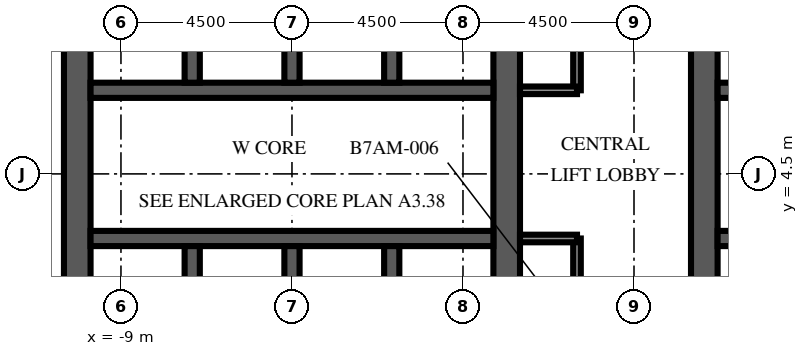
"""IFC4 building model, lengths in metres.
Left out: names, types, materials, properties, quantities, classifications, styles, units other than length and angle.
Written with IfcOpenShell. Run it as: python <this file> out.ifc"""

import sys

from ifc_helpers import new_model, si_unit, direction, frame, frame_2d, origin, place, context, subcontext, project, spatial, rectangle, extrude, element, fill, save


model = new_model("IFC4")
c1 = context("Model", 3, precision=1e-05, world=origin(), true_north=direction((0.0, 1.0)))
c2 = subcontext(c1, "Body", "Model", "MODEL_VIEW")
j1 = project(units=[si_unit("LENGTHUNIT", "METRE"), si_unit("PLANEANGLEUNIT", "RADIAN")], contexts=[c1])
p1 = place(None, origin())
s1 = spatial("IfcSite", under=j1, at=p1, CompositionType="ELEMENT")
p2 = place(p1, origin())
s2 = spatial("IfcBuilding", under=s1, at=p2, CompositionType="ELEMENT")
p3 = place(p2, frame((0.0, 0.0, 260.3)))
s3 = spatial("IfcBuildingStorey", under=s2, at=p3, CompositionType="ELEMENT", Elevation=260.3)
p4 = place(p3, frame((-10.15, -9.0, 0.0), z_axis=(0.0, 0.0, 1.0), x_axis=(0.0, 1.0, 0.0)))
e1 = element("IfcWall", 1, at=p4, inside=s3, PredefinedType="SHEAR", context=c2, shape_type="SweptSolid", body=[
    extrude(rectangle(XDim=27.5, YDim=0.7, at=frame_2d((13.75, 0.0))), origin(), (0.0, 0.0, 1.0), 6.0),
])
p5 = place(p4, frame((12.55, 0.0, 0.0)))
e2 = element("IfcOpeningElement", 2, at=p5, cuts=e1, PredefinedType="OPENING", context=c2, shape_type="SweptSolid", body=[
    extrude(rectangle(XDim=2.4, YDim=2.4, at=frame_2d((1.2, 1.2))), frame((0.0, 0.36, 0.0), z_axis=(0.0, -1.0, 0.0), x_axis=(1.0, 0.0, 0.0)), (0.0, 0.0, 1.0), 0.72),
])
p6 = place(p4, frame((6.825, 0.0, 0.0)))
e3 = element("IfcOpeningElement", 3, at=p6, cuts=e1, PredefinedType="OPENING", context=c2, shape_type="SweptSolid", body=[
    extrude(rectangle(XDim=1.2, YDim=2.1, at=frame_2d((0.6, 1.05))), frame((0.0, 0.36, 0.0), z_axis=(0.0, -1.0, 0.0), x_axis=(1.0, 0.0, 0.0)), (0.0, 0.0, 1.0), 0.72),
])
p7 = place(p4, frame((19.475, 0.0, 0.0)))
e4 = element("IfcOpeningElement", 4, at=p7, cuts=e1, PredefinedType="OPENING", context=c2, shape_type="SweptSolid", body=[
    extrude(rectangle(XDim=1.2, YDim=2.1, at=frame_2d((0.6, 1.05))), frame((0.0, 0.36, 0.0), z_axis=(0.0, -1.0, 0.0), x_axis=(1.0, 0.0, 0.0)), (0.0, 0.0, 1.0), 0.72),
])
p8 = place(p3, frame((1.15, -9.0, 0.0), z_axis=(0.0, 0.0, 1.0), x_axis=(0.0, 1.0, 0.0)))
e5 = element("IfcWall", 5, at=p8, inside=s3, PredefinedType="SHEAR", context=c2, shape_type="SweptSolid", body=[
    extrude(rectangle(XDim=27.5, YDim=0.7, at=frame_2d((13.75, 0.0))), origin(), (0.0, 0.0, 1.0), 6.0),
])
p9 = place(p8, frame((12.55, 0.0, 0.0)))
e6 = element("IfcOpeningElement", 6, at=p9, cuts=e5, PredefinedType="OPENING", context=c2, shape_type="SweptSolid", body=[
    extrude(rectangle(XDim=2.4, YDim=2.4, at=frame_2d((1.2, 1.2))), frame((0.0, 0.36, 0.0), z_axis=(0.0, -1.0, 0.0), x_axis=(1.0, 0.0, 0.0)), (0.0, 0.0, 1.0), 0.72),
])
p10 = place(p8, frame((3.788, 0.0, 0.0)))
e7 = element("IfcOpeningElement", 7, at=p10, cuts=e5, PredefinedType="OPENING", context=c2, shape_type="SweptSolid", body=[
    extrude(rectangle(XDim=0.968, YDim=2.1, at=frame_2d((0.484, 1.05))), frame((0.0, 0.36, 0.0), z_axis=(0.0, -1.0, 0.0), x_axis=(1.0, 0.0, 0.0)), (0.0, 0.0, 1.0), 0.72),
])
p11 = place(p8, frame((23.54, 0.0, 0.0)))
e8 = element("IfcOpeningElement", 8, at=p11, cuts=e5, PredefinedType="OPENING", context=c2, shape_type="SweptSolid", body=[
    extrude(rectangle(XDim=1.2, YDim=2.1, at=frame_2d((0.6, 1.05))), frame((0.0, 0.36, 0.0), z_axis=(0.0, -1.0, 0.0), x_axis=(1.0, 0.0, 0.0)), (0.0, 0.0, 1.0), 0.72),
])
p12 = place(p3, frame((-9.8, 2.8, 0.0), z_axis=(0.0, 0.0, 1.0), x_axis=(1.0, 0.0, 0.0)))
e9 = element("IfcWall", 9, at=p12, inside=s3, PredefinedType="SHEAR", context=c2, shape_type="SweptSolid", body=[
    extrude(rectangle(XDim=10.6, YDim=0.4, at=frame_2d((5.3, 0.0))), origin(), (0.0, 0.0, 1.0), 6.0),
])
p13 = place(p12, frame((0.688, 0.0, 0.0)))
e10 = element("IfcOpeningElement", 10, at=p13, cuts=e9, PredefinedType="OPENING", context=c2, shape_type="SweptSolid", body=[
    extrude(rectangle(XDim=1.1, YDim=2.1, at=frame_2d((0.55, 1.05))), frame((0.0, 0.21, 0.0), z_axis=(0.0, -1.0, 0.0), x_axis=(1.0, 0.0, 0.0)), (0.0, 0.0, 1.0), 0.42),
])
p14 = place(p12, frame((3.438, 0.0, 0.0)))
e11 = element("IfcOpeningElement", 11, at=p14, cuts=e9, PredefinedType="OPENING", context=c2, shape_type="SweptSolid", body=[
    extrude(rectangle(XDim=1.1, YDim=2.1, at=frame_2d((0.55, 1.05))), frame((0.0, 0.21, 0.0), z_axis=(0.0, -1.0, 0.0), x_axis=(1.0, 0.0, 0.0)), (0.0, 0.0, 1.0), 0.42),
])
p15 = place(p12, frame((6.113, 0.0, 0.0)))
e12 = element("IfcOpeningElement", 12, at=p15, cuts=e9, PredefinedType="OPENING", context=c2, shape_type="SweptSolid", body=[
    extrude(rectangle(XDim=1.0, YDim=2.1, at=frame_2d((0.5, 1.05))), frame((0.0, 0.21, 0.0), z_axis=(0.0, -1.0, 0.0), x_axis=(1.0, 0.0, 0.0)), (0.0, 0.0, 1.0), 0.42),
])
p16 = place(p12, frame((8.863, 0.0, 0.0)))
e13 = element("IfcOpeningElement", 13, at=p16, cuts=e9, PredefinedType="OPENING", context=c2, shape_type="SweptSolid", body=[
    extrude(rectangle(XDim=1.0, YDim=2.1, at=frame_2d((0.5, 1.05))), frame((0.0, 0.21, 0.0), z_axis=(0.0, -1.0, 0.0), x_axis=(1.0, 0.0, 0.0)), (0.0, 0.0, 1.0), 0.42),
])
p17 = place(p3, frame((-9.8, 6.7, 0.0), z_axis=(0.0, 0.0, 1.0), x_axis=(1.0, 0.0, 0.0)))
e14 = element("IfcWall", 14, at=p17, inside=s3, PredefinedType="SHEAR", context=c2, shape_type="SweptSolid", body=[
    extrude(rectangle(XDim=10.6, YDim=0.4, at=frame_2d((5.3, 0.0))), origin(), (0.0, 0.0, 1.0), 6.0),
])
p18 = place(p17, frame((3.438, 0.0, 0.0)))
e15 = element("IfcOpeningElement", 15, at=p18, cuts=e14, PredefinedType="OPENING", context=c2, shape_type="SweptSolid", body=[
    extrude(rectangle(XDim=1.1, YDim=2.1, at=frame_2d((0.55, 1.05))), frame((0.0, 0.21, 0.0), z_axis=(0.0, -1.0, 0.0), x_axis=(1.0, 0.0, 0.0)), (0.0, 0.0, 1.0), 0.42),
])
p19 = place(p17, frame((6.062, 0.0, 0.0)))
e16 = element("IfcOpeningElement", 16, at=p19, cuts=e14, PredefinedType="OPENING", context=c2, shape_type="SweptSolid", body=[
    extrude(rectangle(XDim=1.1, YDim=2.1, at=frame_2d((0.55, 1.05))), frame((0.0, 0.21, 0.0), z_axis=(0.0, -1.0, 0.0), x_axis=(1.0, 0.0, 0.0)), (0.0, 0.0, 1.0), 0.42),
])
p20 = place(p17, frame((8.812, 0.0, 0.0)))
e17 = element("IfcOpeningElement", 17, at=p20, cuts=e14, PredefinedType="OPENING", context=c2, shape_type="SweptSolid", body=[
    extrude(rectangle(XDim=1.1, YDim=2.1, at=frame_2d((0.55, 1.05))), frame((0.0, 0.21, 0.0), z_axis=(0.0, -1.0, 0.0), x_axis=(1.0, 0.0, 0.0)), (0.0, 0.0, 1.0), 0.42),
])
p21 = place(p17, frame((0.738, 0.0, 0.0)))
e18 = element("IfcOpeningElement", 18, at=p21, cuts=e14, PredefinedType="OPENING", context=c2, shape_type="SweptSolid", body=[
    extrude(rectangle(XDim=1.0, YDim=2.1, at=frame_2d((0.5, 1.05))), frame((0.0, 0.21, 0.0), z_axis=(0.0, -1.0, 0.0), x_axis=(1.0, 0.0, 0.0)), (0.0, 0.0, 1.0), 0.42),
])
for number, where, z_axis, x_axis in (
    (19, (-7.125, -0.3, 0.0), (0.0, 0.0, 1.0), (0.0, 1.0, 0.0)),
    (20, (-7.125, 6.9, 0.0), (0.0, 0.0, 1.0), (0.0, 1.0, 0.0)),
    (21, (-4.5, -0.3, 0.0), (0.0, 0.0, 1.0), (0.0, 1.0, 0.0)),
    (22, (-4.5, 6.9, 0.0), (0.0, 0.0, 1.0), (0.0, 1.0, 0.0)),
    (23, (-1.875, -0.3, 0.0), (0.0, 0.0, 1.0), (0.0, 1.0, 0.0)),
    (24, (-1.875, 6.9, 0.0), (0.0, 0.0, 1.0), (0.0, 1.0, 0.0)),
):
    element("IfcWall", number, at=place(p3, frame(where, z_axis=z_axis, x_axis=x_axis)), inside=s3, PredefinedType="SHEAR", context=c2, shape_type="SweptSolid", body=[
        extrude(rectangle(XDim=2.9, YDim=0.4, at=frame_2d((1.45, 0.0))), origin(), (0.0, 0.0, 1.0), 6.0),
    ])
p22 = place(p3, frame((6.35, -9.0, 0.0), z_axis=(0.0, 0.0, 1.0), x_axis=(0.0, 1.0, 0.0)))
e25 = element("IfcWall", 25, at=p22, inside=s3, PredefinedType="SHEAR", context=c2, shape_type="SweptSolid", body=[
    extrude(rectangle(XDim=27.5, YDim=0.7, at=frame_2d((13.75, 0.0))), origin(), (0.0, 0.0, 1.0), 6.0),
])
p23 = place(p22, frame((12.55, 0.0, 0.0)))
e26 = element("IfcOpeningElement", 26, at=p23, cuts=e25, PredefinedType="OPENING", context=c2, shape_type="SweptSolid", body=[
    extrude(rectangle(XDim=2.4, YDim=2.4, at=frame_2d((1.2, 1.2))), frame((0.0, 0.36, 0.0), z_axis=(0.0, -1.0, 0.0), x_axis=(1.0, 0.0, 0.0)), (0.0, 0.0, 1.0), 0.72),
])
p24 = place(p22, frame((3.788, 0.0, 0.0)))
e27 = element("IfcOpeningElement", 27, at=p24, cuts=e25, PredefinedType="OPENING", context=c2, shape_type="SweptSolid", body=[
    extrude(rectangle(XDim=0.968, YDim=2.1, at=frame_2d((0.484, 1.05))), frame((0.0, 0.36, 0.0), z_axis=(0.0, -1.0, 0.0), x_axis=(1.0, 0.0, 0.0)), (0.0, 0.0, 1.0), 0.72),
])
p25 = place(p22, frame((23.54, 0.0, 0.0)))
e28 = element("IfcOpeningElement", 28, at=p25, cuts=e25, PredefinedType="OPENING", context=c2, shape_type="SweptSolid", body=[
    extrude(rectangle(XDim=1.2, YDim=2.1, at=frame_2d((0.6, 1.05))), frame((0.0, 0.36, 0.0), z_axis=(0.0, -1.0, 0.0), x_axis=(1.0, 0.0, 0.0)), (0.0, 0.0, 1.0), 0.72),
])
p26 = place(p3, frame((6.7, 2.8, 0.0), z_axis=(0.0, 0.0, 1.0), x_axis=(1.0, 0.0, 0.0)))
e29 = element("IfcWall", 29, at=p26, inside=s3, PredefinedType="SHEAR", context=c2, shape_type="SweptSolid", body=[
    extrude(rectangle(XDim=10.6, YDim=0.4, at=frame_2d((5.3, 0.0))), origin(), (0.0, 0.0, 1.0), 6.0),
])
p27 = place(p26, frame((0.688, 0.0, 0.0)))
e30 = element("IfcOpeningElement", 30, at=p27, cuts=e29, PredefinedType="OPENING", context=c2, shape_type="SweptSolid", body=[
    extrude(rectangle(XDim=1.1, YDim=2.1, at=frame_2d((0.55, 1.05))), frame((0.0, 0.21, 0.0), z_axis=(0.0, -1.0, 0.0), x_axis=(1.0, 0.0, 0.0)), (0.0, 0.0, 1.0), 0.42),
])
p28 = place(p26, frame((3.438, 0.0, 0.0)))
e31 = element("IfcOpeningElement", 31, at=p28, cuts=e29, PredefinedType="OPENING", context=c2, shape_type="SweptSolid", body=[
    extrude(rectangle(XDim=1.1, YDim=2.1, at=frame_2d((0.55, 1.05))), frame((0.0, 0.21, 0.0), z_axis=(0.0, -1.0, 0.0), x_axis=(1.0, 0.0, 0.0)), (0.0, 0.0, 1.0), 0.42),
])
p29 = place(p26, frame((6.113, 0.0, 0.0)))
e32 = element("IfcOpeningElement", 32, at=p29, cuts=e29, PredefinedType="OPENING", context=c2, shape_type="SweptSolid", body=[
    extrude(rectangle(XDim=1.0, YDim=2.1, at=frame_2d((0.5, 1.05))), frame((0.0, 0.21, 0.0), z_axis=(0.0, -1.0, 0.0), x_axis=(1.0, 0.0, 0.0)), (0.0, 0.0, 1.0), 0.42),
])
p30 = place(p26, frame((8.863, 0.0, 0.0)))
e33 = element("IfcOpeningElement", 33, at=p30, cuts=e29, PredefinedType="OPENING", context=c2, shape_type="SweptSolid", body=[
    extrude(rectangle(XDim=1.0, YDim=2.1, at=frame_2d((0.5, 1.05))), frame((0.0, 0.21, 0.0), z_axis=(0.0, -1.0, 0.0), x_axis=(1.0, 0.0, 0.0)), (0.0, 0.0, 1.0), 0.42),
])
p31 = place(p3, frame((6.7, 6.7, 0.0), z_axis=(0.0, 0.0, 1.0), x_axis=(1.0, 0.0, 0.0)))
e34 = element("IfcWall", 34, at=p31, inside=s3, PredefinedType="SHEAR", context=c2, shape_type="SweptSolid", body=[
    extrude(rectangle(XDim=10.6, YDim=0.4, at=frame_2d((5.3, 0.0))), origin(), (0.0, 0.0, 1.0), 6.0),
])
p32 = place(p31, frame((3.438, 0.0, 0.0)))
e35 = element("IfcOpeningElement", 35, at=p32, cuts=e34, PredefinedType="OPENING", context=c2, shape_type="SweptSolid", body=[
    extrude(rectangle(XDim=1.1, YDim=2.1, at=frame_2d((0.55, 1.05))), frame((0.0, 0.21, 0.0), z_axis=(0.0, -1.0, 0.0), x_axis=(1.0, 0.0, 0.0)), (0.0, 0.0, 1.0), 0.42),
])
p33 = place(p31, frame((6.062, 0.0, 0.0)))
e36 = element("IfcOpeningElement", 36, at=p33, cuts=e34, PredefinedType="OPENING", context=c2, shape_type="SweptSolid", body=[
    extrude(rectangle(XDim=1.1, YDim=2.1, at=frame_2d((0.55, 1.05))), frame((0.0, 0.21, 0.0), z_axis=(0.0, -1.0, 0.0), x_axis=(1.0, 0.0, 0.0)), (0.0, 0.0, 1.0), 0.42),
])
p34 = place(p31, frame((8.812, 0.0, 0.0)))
e37 = element("IfcOpeningElement", 37, at=p34, cuts=e34, PredefinedType="OPENING", context=c2, shape_type="SweptSolid", body=[
    extrude(rectangle(XDim=1.1, YDim=2.1, at=frame_2d((0.55, 1.05))), frame((0.0, 0.21, 0.0), z_axis=(0.0, -1.0, 0.0), x_axis=(1.0, 0.0, 0.0)), (0.0, 0.0, 1.0), 0.42),
])
p35 = place(p31, frame((0.738, 0.0, 0.0)))
e38 = element("IfcOpeningElement", 38, at=p35, cuts=e34, PredefinedType="OPENING", context=c2, shape_type="SweptSolid", body=[
    extrude(rectangle(XDim=1.0, YDim=2.1, at=frame_2d((0.5, 1.05))), frame((0.0, 0.21, 0.0), z_axis=(0.0, -1.0, 0.0), x_axis=(1.0, 0.0, 0.0)), (0.0, 0.0, 1.0), 0.42),
])
p36 = place(p3, frame((3.0, -3.5, 0.0), z_axis=(0.0, 0.0, 1.0), x_axis=(0.0, 1.0, 0.0)))
e39 = element("IfcWall", 39, at=p36, inside=s3, PredefinedType="PARTITIONING", context=c2, shape_type="SweptSolid", body=[
    extrude(rectangle(XDim=6.3, YDim=0.2, at=frame_2d((3.15, 0.0))), origin(), (0.0, 0.0, 1.0), 5.55),
])
p37 = place(p36, frame((3.35, 0.0, 0.0)))
e40 = element("IfcOpeningElement", 40, at=p37, cuts=e39, PredefinedType="OPENING", context=c2, shape_type="SweptSolid", body=[
    extrude(rectangle(XDim=1.0, YDim=2.1, at=frame_2d((0.5, 1.05))), frame((0.0, 0.11, 0.0), z_axis=(0.0, -1.0, 0.0), x_axis=(1.0, 0.0, 0.0)), (0.0, 0.0, 1.0), 0.22),
])
p38 = place(p3, frame((3.0, 6.7, 0.0), z_axis=(0.0, 0.0, 1.0), x_axis=(0.0, 1.0, 0.0)))
e41 = element("IfcWall", 41, at=p38, inside=s3, PredefinedType="PARTITIONING", context=c2, shape_type="SweptSolid", body=[
    extrude(rectangle(XDim=11.8, YDim=0.2, at=frame_2d((5.9, 0.0))), origin(), (0.0, 0.0, 1.0), 5.55),
])
p39 = place(p38, frame((5.6, 0.0, 0.0)))
e42 = element("IfcOpeningElement", 42, at=p39, cuts=e41, PredefinedType="OPENING", context=c2, shape_type="SweptSolid", body=[
    extrude(rectangle(XDim=1.0, YDim=2.1, at=frame_2d((0.5, 1.05))), frame((0.0, 0.11, 0.0), z_axis=(0.0, -1.0, 0.0), x_axis=(1.0, 0.0, 0.0)), (0.0, 0.0, 1.0), 0.22),
])
for number, where, z_axis, x_axis in (
    (43, (1.5, 2.8, 0.0), (0.0, 0.0, 1.0), (1.0, 0.0, 0.0)),
    (44, (1.5, 6.7, 0.0), (0.0, 0.0, 1.0), (1.0, 0.0, 0.0)),
):
    element("IfcWall", number, at=place(p3, frame(where, z_axis=z_axis, x_axis=x_axis)), inside=s3, PredefinedType="PARTITIONING", context=c2, shape_type="SweptSolid", body=[
        extrude(rectangle(XDim=1.5, YDim=0.2, at=frame_2d((0.75, 0.0))), origin(), (0.0, 0.0, 1.0), 5.55),
    ])
p40 = place(p13, origin())
e45 = element("IfcDoor", 45, at=p40, inside=s3, OperationType="DOUBLE_DOOR_SLIDING", PredefinedType="DOOR", context=c2, shape_type="SweptSolid", body=[
    extrude(rectangle(XDim=1.1, YDim=2.1, at=frame_2d((0.55, 1.05))), frame((0.0, 0.025, 0.0), z_axis=(0.0, -1.0, 0.0), x_axis=(1.0, 0.0, 0.0)), (0.0, 0.0, 1.0), 0.05),
])
fill(e10, e45)
p41 = place(p14, origin())
e46 = element("IfcDoor", 46, at=p41, inside=s3, OperationType="DOUBLE_DOOR_SLIDING", PredefinedType="DOOR", context=c2, shape_type="SweptSolid", body=[
    extrude(rectangle(XDim=1.1, YDim=2.1, at=frame_2d((0.55, 1.05))), frame((0.0, 0.025, 0.0), z_axis=(0.0, -1.0, 0.0), x_axis=(1.0, 0.0, 0.0)), (0.0, 0.0, 1.0), 0.05),
])
fill(e11, e46)
p42 = place(p18, origin())
e47 = element("IfcDoor", 47, at=p42, inside=s3, OperationType="DOUBLE_DOOR_SLIDING", PredefinedType="DOOR", context=c2, shape_type="SweptSolid", body=[
    extrude(rectangle(XDim=1.1, YDim=2.1, at=frame_2d((0.55, 1.05))), frame((0.0, 0.025, 0.0), z_axis=(0.0, -1.0, 0.0), x_axis=(1.0, 0.0, 0.0)), (0.0, 0.0, 1.0), 0.05),
])
fill(e15, e47)
p43 = place(p19, origin())
e48 = element("IfcDoor", 48, at=p43, inside=s3, OperationType="DOUBLE_DOOR_SLIDING", PredefinedType="DOOR", context=c2, shape_type="SweptSolid", body=[
    extrude(rectangle(XDim=1.1, YDim=2.1, at=frame_2d((0.55, 1.05))), frame((0.0, 0.025, 0.0), z_axis=(0.0, -1.0, 0.0), x_axis=(1.0, 0.0, 0.0)), (0.0, 0.0, 1.0), 0.05),
])
fill(e16, e48)
p44 = place(p20, origin())
e49 = element("IfcDoor", 49, at=p44, inside=s3, OperationType="DOUBLE_DOOR_SLIDING", PredefinedType="DOOR", context=c2, shape_type="SweptSolid", body=[
    extrude(rectangle(XDim=1.1, YDim=2.1, at=frame_2d((0.55, 1.05))), frame((0.0, 0.025, 0.0), z_axis=(0.0, -1.0, 0.0), x_axis=(1.0, 0.0, 0.0)), (0.0, 0.0, 1.0), 0.05),
])
fill(e17, e49)
p45 = place(p5, origin())
e50 = element("IfcDoor", 50, at=p45, inside=s3, OperationType="DOUBLE_DOOR_DOUBLE_SWING", PredefinedType="DOOR", context=c2, shape_type="SweptSolid", body=[
    extrude(rectangle(XDim=2.4, YDim=2.4, at=frame_2d((1.2, 1.2))), frame((0.0, 0.025, 0.0), z_axis=(0.0, -1.0, 0.0), x_axis=(1.0, 0.0, 0.0)), (0.0, 0.0, 1.0), 0.05),
])
fill(e2, e50)
p46 = place(p9, origin())
e51 = element("IfcDoor", 51, at=p46, inside=s3, OperationType="DOUBLE_DOOR_DOUBLE_SWING", PredefinedType="DOOR", context=c2, shape_type="SweptSolid", body=[
    extrude(rectangle(XDim=2.4, YDim=2.4, at=frame_2d((1.2, 1.2))), frame((0.0, 0.025, 0.0), z_axis=(0.0, -1.0, 0.0), x_axis=(1.0, 0.0, 0.0)), (0.0, 0.0, 1.0), 0.05),
])
fill(e6, e51)
p47 = place(p23, origin())
e52 = element("IfcDoor", 52, at=p47, inside=s3, OperationType="DOUBLE_DOOR_DOUBLE_SWING", PredefinedType="DOOR", context=c2, shape_type="SweptSolid", body=[
    extrude(rectangle(XDim=2.4, YDim=2.4, at=frame_2d((1.2, 1.2))), frame((0.0, 0.025, 0.0), z_axis=(0.0, -1.0, 0.0), x_axis=(1.0, 0.0, 0.0)), (0.0, 0.0, 1.0), 0.05),
])
fill(e26, e52)
p48 = place(p15, origin())
e53 = element("IfcDoor", 53, at=p48, inside=s3, OperationType="SINGLE_SWING_LEFT", PredefinedType="DOOR", context=c2, shape_type="SweptSolid", body=[
    extrude(rectangle(XDim=1.0, YDim=2.1, at=frame_2d((0.5, 1.05))), frame((0.0, 0.025, 0.0), z_axis=(0.0, -1.0, 0.0), x_axis=(1.0, 0.0, 0.0)), (0.0, 0.0, 1.0), 0.05),
])
fill(e12, e53)
p49 = place(p16, origin())
e54 = element("IfcDoor", 54, at=p49, inside=s3, OperationType="SINGLE_SWING_RIGHT", PredefinedType="DOOR", context=c2, shape_type="SweptSolid", body=[
    extrude(rectangle(XDim=1.0, YDim=2.1, at=frame_2d((0.5, 1.05))), frame((0.0, 0.025, 0.0), z_axis=(0.0, -1.0, 0.0), x_axis=(1.0, 0.0, 0.0)), (0.0, 0.0, 1.0), 0.05),
])
fill(e13, e54)
p50 = place(p21, origin())
e55 = element("IfcDoor", 55, at=p50, inside=s3, OperationType="SINGLE_SWING_LEFT", PredefinedType="DOOR", context=c2, shape_type="SweptSolid", body=[
    extrude(rectangle(XDim=1.0, YDim=2.1, at=frame_2d((0.5, 1.05))), frame((0.0, 0.025, 0.0), z_axis=(0.0, -1.0, 0.0), x_axis=(1.0, 0.0, 0.0)), (0.0, 0.0, 1.0), 0.05),
])
fill(e18, e55)
save(model, sys.argv[1])
